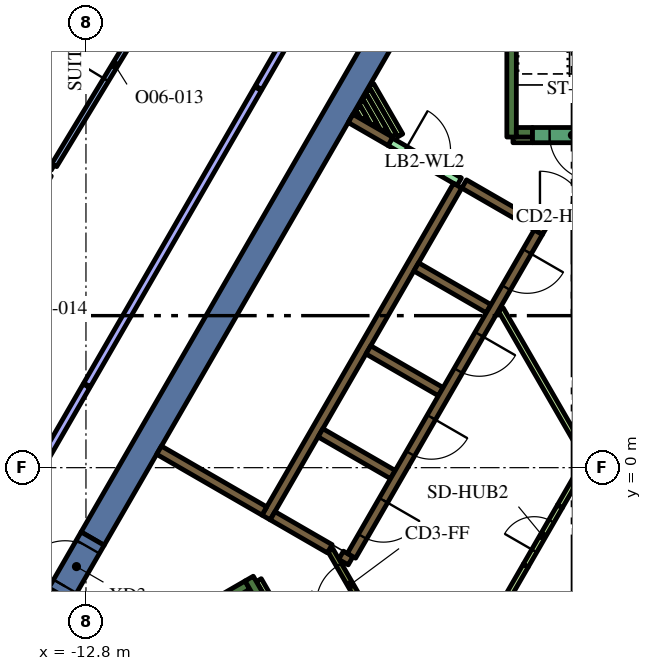
"""IFC4 building model, lengths in metres.
Left out: names, types, materials, properties, quantities, classifications, styles, units other than length and angle.
Written with IfcOpenShell. Run it as: python <this file> out.ifc"""

import sys

from ifc_helpers import new_model, si_unit, direction, frame, frame_2d, origin, place, context, subcontext, project, spatial, polyline, rectangle, outline, extrude, element, fill, save


model = new_model("IFC4")
c1 = context("Model", 3, precision=1e-05, world=origin(), true_north=direction((0.0, 1.0)))
c2 = subcontext(c1, "Body", "Model", "MODEL_VIEW")
j1 = project(units=[si_unit("LENGTHUNIT", "METRE"), si_unit("PLANEANGLEUNIT", "RADIAN")], contexts=[c1])
p1 = place(None, origin())
s1 = spatial("IfcSite", under=j1, at=p1, CompositionType="ELEMENT")
p2 = place(p1, origin())
s2 = spatial("IfcBuilding", under=s1, at=p2, CompositionType="ELEMENT")
p3 = place(p2, frame((0.0, 0.0, 201.6)))
s3 = spatial("IfcBuildingStorey", under=s2, at=p3, CompositionType="ELEMENT", Elevation=201.6)
p4 = place(p3, frame((-13.475, -3.339, 0.0), z_axis=(0.0, 0.0, 1.0), x_axis=(-0.500008214683, -0.866020660983, 0.0)))
e1 = element("IfcWall", 1, at=p4, inside=s3, PredefinedType="SOLIDWALL", context=c2, shape_type="SweptSolid", body=[
    extrude(rectangle(XDim=2.884, YDim=0.7, at=frame_2d((1.442, 0.0))), origin(), (0.0, 0.0, 1.0), 4.2),
])
p5 = place(p3, frame((-12.625, -1.867, 0.0), z_axis=(0.0, 0.0, 1.0), x_axis=(0.499998841866, 0.866026072432, 0.0)))
e2 = element("IfcWall", 2, at=p5, inside=s3, PredefinedType="SOLIDWALL", context=c2, shape_type="SweptSolid", body=[
    extrude(rectangle(XDim=16.694, YDim=0.7, at=frame_2d((8.347, 0.0))), origin(), (0.0, 0.0, 1.0), 4.2),
])
p6 = place(p3, frame((-1.6, 8.7, 0.0), z_axis=(0.0, 0.0, 1.0), x_axis=(0.0, 1.0, 0.0)))
e3 = element("IfcWall", 3, at=p6, inside=s3, PredefinedType="SOLIDWALL", context=c2, shape_type="SweptSolid", body=[
    extrude(rectangle(XDim=7.05, YDim=0.25, at=frame_2d((3.525, 0.0))), origin(), (0.0, 0.0, 1.0), 4.2),
])
p7 = place(p3, frame((-1.475, 8.825, 0.0), z_axis=(0.0, 0.0, 1.0), x_axis=(1.0, 0.0, 0.0)))
e4 = element("IfcWall", 4, at=p7, inside=s3, PredefinedType="SOLIDWALL", context=c2, shape_type="SweptSolid", body=[
    extrude(rectangle(XDim=0.425, YDim=0.25, at=frame_2d((0.212, 0.0))), origin(), (0.0, 0.0, 1.0), 4.2),
])
p8 = place(p3, frame((-14.44, -6.49, 0.0), z_axis=(0.0, 0.0, 1.0), x_axis=(0.866022966069, 0.500004222222, 0.0)))
e5 = element("IfcWall", 5, at=p8, inside=s3, PredefinedType="SOLIDWALL", context=c2, shape_type="SweptSolid", body=[
    extrude(rectangle(XDim=6.8, YDim=0.25, at=frame_2d((3.4, 0.0))), origin(), (0.0, 0.0, 1.0), 4.2),
])
p9 = place(p3, frame((-8.168, -3.503, 0.0), z_axis=(0.0, 0.0, 1.0), x_axis=(-0.499952099219, 0.866053057547, 0.0)))
e6 = element("IfcWall", 6, at=p9, inside=s3, PredefinedType="SOLIDWALL", context=c2, shape_type="SweptSolid", body=[
    extrude(rectangle(XDim=0.675, YDim=0.25, at=frame_2d((0.337, 0.0))), origin(), (0.0, 0.0, 1.0), 4.2),
])
p10 = place(p3, frame((-3.02, 7.419, 0.0), z_axis=(0.0, 0.0, 1.0), x_axis=(-0.500022956343, -0.866012149528, 0.0)))
e7 = element("IfcWall", 7, at=p10, inside=s3, PredefinedType="SOLIDWALL", context=c2, shape_type="SweptSolid", body=[
    extrude(rectangle(XDim=10.08, YDim=0.25, at=frame_2d((5.04, 0.0))), origin(), (0.0, 0.0, 1.0), 4.2),
])
p11 = place(p3, origin())
e8 = element("IfcWall", 8, at=p11, inside=s3, PredefinedType="SOLIDWALL", context=c2, shape_type="SweptSolid", body=[
    extrude(outline(polyline([(-2.912, 7.356), (-2.787, 7.573), (-1.232, 6.675), (-1.303, 6.675), (-1.304, 6.675), (-1.304, 6.675), (-1.304, 6.525), (-1.304, 6.525), (-1.303, 6.525), (-0.971, 6.525), (-0.665, 6.348), (-0.79, 6.132), (-1.007, 6.257), (-1.007, 6.257), (-2.912, 7.356)])), origin(), (0.0, 0.0, 1.0), 4.2),
])
for number, where, z_axis, x_axis in (
    (9, (-2.204, 4.182, 0.0), (0.0, 0.0, 1.0), (-0.866, 0.5, 0.0)),
    (10, (-5.369, 3.1, 0.0), (0.0, 0.0, 1.0), (0.866, -0.5, 0.0)),
    (11, (-4.724, -0.182, 0.0), (0.0, 0.0, 1.0), (-0.866, 0.5, 0.0)),
):
    element("IfcWall", number, at=place(p3, frame(where, z_axis=z_axis, x_axis=x_axis)), inside=s3, PredefinedType="SOLIDWALL", context=c2, shape_type="SweptSolid", body=[
        extrude(rectangle(XDim=2.2, YDim=0.25, at=frame_2d((1.1, 0.0))), origin(), (0.0, 0.0, 1.0), 4.2),
    ])
p12 = place(p3, frame((-6.088, -2.305, 0.0), z_axis=(0.0, 0.0, 1.0), x_axis=(0.866059450854, -0.499941024108, 0.0)))
e12 = element("IfcWall", 12, at=p12, inside=s3, PredefinedType="SOLIDWALL", context=c2, shape_type="SweptSolid", body=[
    extrude(rectangle(XDim=0.29, YDim=0.25, at=frame_2d((0.145, 0.0))), origin(), (0.0, 0.0, 1.0), 4.2),
])
p13 = place(p3, frame((-7.889, -1.265, 0.0), z_axis=(0.0, 0.0, 1.0), x_axis=(0.865986741702, -0.500066958712, 0.0)))
e13 = element("IfcWall", 13, at=p13, inside=s3, PredefinedType="SOLIDWALL", context=c2, shape_type="SweptSolid", body=[
    extrude(rectangle(XDim=1.738, YDim=0.25, at=frame_2d((0.869, 0.0))), origin(), (0.0, 0.0, 1.0), 4.2),
])
p14 = place(p3, frame((-8.106, -1.14, 0.0), z_axis=(0.0, 0.0, 1.0), x_axis=(-0.866008981251, 0.500028443584, 0.0)))
e14 = element("IfcWall", 14, at=p14, inside=s3, PredefinedType="SOLIDWALL", context=c2, shape_type="SweptSolid", body=[
    extrude(rectangle(XDim=3.2, YDim=0.25, at=frame_2d((1.6, 0.0))), origin(), (0.0, 0.0, 1.0), 4.2),
])
p15 = place(p3, frame((-5.837, 9.19, 0.0), z_axis=(0.0, 0.0, 1.0), x_axis=(0.866024298998, -0.500001913541, 0.0)))
e15 = element("IfcWall", 15, at=p15, inside=s3, PredefinedType="SOLIDWALL", context=c2, shape_type="SweptSolid", body=[
    extrude(rectangle(XDim=1.21, YDim=0.25, at=frame_2d((0.605, 0.0))), origin(), (0.0, 0.0, 1.0), 4.2),
])
p16 = place(p3, frame((-8.252, -2.958, 0.0), z_axis=(0.0, 0.0, 1.0), x_axis=(0.500174715838, -0.865924508047, 0.0)))
e16 = element("IfcWall", 16, at=p16, inside=s3, PredefinedType="PARTITIONING", context=c2, shape_type="SweptSolid", body=[
    extrude(rectangle(XDim=0.514, YDim=0.15, at=frame_2d((0.257, 0.0))), origin(), (0.0, 0.0, 1.0), 3.45),
])
p17 = place(p3, frame((-5.294, 10.067, 0.0), z_axis=(0.0, 0.0, 1.0), x_axis=(0.500054140411, -0.865994143547, 0.0)))
e17 = element("IfcWall", 17, at=p17, inside=s3, PredefinedType="PARTITIONING", context=c2, shape_type="SweptSolid", body=[
    extrude(rectangle(XDim=1.529, YDim=0.15, at=frame_2d((0.765, 0.0))), origin(), (0.0, 0.0, 1.0), 3.45),
])
p18 = place(p3, frame((-5.381, 9.917, 0.0), z_axis=(0.0, 0.0, 1.0), x_axis=(0.500136970483, -0.865946309396, 0.0)))
e18 = element("IfcWall", 18, at=p18, inside=s3, PredefinedType="PARTITIONING", context=c2, shape_type="SweptSolid", body=[
    extrude(rectangle(XDim=1.359, YDim=0.15, at=frame_2d((0.68, 0.0))), origin(), (0.0, 0.0, 1.0), 3.45),
])
p19 = place(p3, frame((-5.467, 9.767, 0.0), z_axis=(0.0, 0.0, 1.0), x_axis=(0.500168849293, -0.86592789665, 0.0)))
e19 = element("IfcWall", 19, at=p19, inside=s3, PredefinedType="PARTITIONING", context=c2, shape_type="SweptSolid", body=[
    extrude(rectangle(XDim=1.01, YDim=0.15, at=frame_2d((0.505, 0.0))), origin(), (0.0, 0.0, 1.0), 3.45),
])
p20 = place(p3, frame((-5.554, 9.617, 0.0), z_axis=(0.0, 0.0, 1.0), x_axis=(0.500253084543, -0.86587923604, 0.0)))
e20 = element("IfcWall", 20, at=p20, inside=s3, PredefinedType="PARTITIONING", context=c2, shape_type="SweptSolid", body=[
    extrude(rectangle(XDim=0.664, YDim=0.15, at=frame_2d((0.332, 0.0))), origin(), (0.0, 0.0, 1.0), 3.45),
])
p21 = place(p3, frame((-5.64, 9.467, 0.0), z_axis=(0.0, 0.0, 1.0), x_axis=(0.499944387978, -0.86605750902, 0.0)))
e21 = element("IfcWall", 21, at=p21, inside=s3, PredefinedType="PARTITIONING", context=c2, shape_type="SweptSolid", body=[
    extrude(rectangle(XDim=0.317, YDim=0.15, at=frame_2d((0.159, 0.0))), origin(), (0.0, 0.0, 1.0), 3.45),
])
p22 = place(p3, frame((-1.564, 8.625, 0.0), z_axis=(0.0, 0.0, 1.0), x_axis=(1.0, 0.0, 0.0)))
e22 = element("IfcWall", 22, at=p22, inside=s3, PredefinedType="PARTITIONING", context=c2, shape_type="SweptSolid", body=[
    extrude(rectangle(XDim=0.514, YDim=0.15, at=frame_2d((0.257, 0.0))), origin(), (0.0, 0.0, 1.0), 3.45),
])
p23 = place(p3, frame((-1.887, 4.168, 0.0), z_axis=(0.0, 0.0, 1.0), x_axis=(0.499997069472, -0.866027095719, 0.0)))
e23 = element("IfcWall", 23, at=p23, inside=s3, PredefinedType="PARTITIONING", context=c2, shape_type="SweptSolid", body=[
    extrude(rectangle(XDim=9.106, YDim=0.15, at=frame_2d((4.553, 0.0))), origin(), (0.0, 0.0, 1.0), 3.45),
])
for number, where, z_axis, x_axis in (
    (24, (-0.329, -1.021, 0.0), (0.0, 0.0, 1.0), (0.5, 0.866, 0.0)),
    (25, (-1.887, -3.718, 0.0), (0.0, 0.0, 1.0), (0.5, 0.866, 0.0)),
):
    element("IfcWall", number, at=place(p3, frame(where, z_axis=z_axis, x_axis=x_axis)), inside=s3, PredefinedType="PARTITIONING", context=c2, shape_type="SweptSolid", body=[
        extrude(rectangle(XDim=1.315, YDim=0.15, at=frame_2d((0.657, 0.0))), origin(), (0.0, 0.0, 1.0), 3.45),
    ])
p24 = place(p3, frame((-0.898, 6.194, 0.0), z_axis=(0.0, 0.0, 1.0), x_axis=(-0.499996202215, -0.866027596426, 0.0)))
e26 = element("IfcWall", 26, at=p24, inside=s3, PredefinedType="SOLIDWALL", context=c2, shape_type="SweptSolid", body=[
    extrude(rectangle(XDim=9.83, YDim=0.25, at=frame_2d((4.915, 0.0))), origin(), (0.0, 0.0, 1.0), 4.2),
])
p25 = place(p24, frame((0.585, 0.0, 0.0)))
e27 = element("IfcOpeningElement", 27, at=p25, cuts=e26, PredefinedType="OPENING", context=c2, shape_type="SweptSolid", body=[
    extrude(rectangle(XDim=1.1, YDim=2.1, at=frame_2d((0.55, 1.05))), frame((0.0, 0.135, 0.0), z_axis=(0.0, -1.0, 0.0), x_axis=(1.0, 0.0, 0.0)), (0.0, 0.0, 1.0), 0.27),
])
p26 = place(p24, frame((3.105, 0.0, 0.0)))
e28 = element("IfcOpeningElement", 28, at=p26, cuts=e26, PredefinedType="OPENING", context=c2, shape_type="SweptSolid", body=[
    extrude(rectangle(XDim=1.1, YDim=2.1, at=frame_2d((0.55, 1.05))), frame((0.0, 0.135, 0.0), z_axis=(0.0, -1.0, 0.0), x_axis=(1.0, 0.0, 0.0)), (0.0, 0.0, 1.0), 0.27),
])
p27 = place(p24, frame((5.625, 0.0, 0.0)))
e29 = element("IfcOpeningElement", 29, at=p27, cuts=e26, PredefinedType="OPENING", context=c2, shape_type="SweptSolid", body=[
    extrude(rectangle(XDim=1.1, YDim=2.1, at=frame_2d((0.55, 1.05))), frame((0.0, 0.135, 0.0), z_axis=(0.0, -1.0, 0.0), x_axis=(1.0, 0.0, 0.0)), (0.0, 0.0, 1.0), 0.27),
])
p28 = place(p24, frame((8.145, 0.0, 0.0)))
e30 = element("IfcOpeningElement", 30, at=p28, cuts=e26, PredefinedType="OPENING", context=c2, shape_type="SweptSolid", body=[
    extrude(rectangle(XDim=1.1, YDim=2.1, at=frame_2d((0.55, 1.05))), frame((0.0, 0.135, 0.0), z_axis=(0.0, -1.0, 0.0), x_axis=(1.0, 0.0, 0.0)), (0.0, 0.0, 1.0), 0.27),
])
p29 = place(p3, frame((1.05, 8.75, 0.0), z_axis=(0.0, 0.0, 1.0), x_axis=(-1.0, 0.0, 0.0)))
e31 = element("IfcWall", 31, at=p29, inside=s3, PredefinedType="SOLIDWALL", context=c2, shape_type="SweptSolid", body=[
    extrude(rectangle(XDim=2.1, YDim=0.4, at=frame_2d((1.05, 0.0))), origin(), (0.0, 0.0, 1.0), 4.2),
])
p30 = place(p29, frame((0.45, 0.0, 0.0)))
e32 = element("IfcOpeningElement", 32, at=p30, cuts=e31, PredefinedType="OPENING", context=c2, shape_type="SweptSolid", body=[
    extrude(rectangle(XDim=1.2, YDim=2.1, at=frame_2d((0.6, 1.05))), frame((0.0, 0.21, 0.0), z_axis=(0.0, -1.0, 0.0), x_axis=(1.0, 0.0, 0.0)), (0.0, 0.0, 1.0), 0.42),
])
p31 = place(p3, frame((-1.303, 6.6, 0.0), z_axis=(0.0, 0.0, 1.0), x_axis=(1.0, 0.0, 0.0)))
e33 = element("IfcWall", 33, at=p31, inside=s3, PredefinedType="PARTITIONING", context=c2, shape_type="SweptSolid", body=[
    extrude(rectangle(XDim=2.1, YDim=0.15, at=frame_2d((1.05, 0.0))), origin(), (0.0, 0.0, 1.0), 4.2),
])
p32 = place(p31, frame((0.45, 0.0, 0.0)))
e34 = element("IfcOpeningElement", 34, at=p32, cuts=e33, PredefinedType="OPENING", context=c2, shape_type="SweptSolid", body=[
    extrude(rectangle(XDim=1.2, YDim=2.1, at=frame_2d((0.6, 1.05))), frame((0.0, 0.085, 0.0), z_axis=(0.0, -1.0, 0.0), x_axis=(1.0, 0.0, 0.0)), (0.0, 0.0, 1.0), 0.17),
])
p33 = place(p3, frame((-5.317, -3.99, 0.0), z_axis=(0.0, 0.0, 1.0), x_axis=(-0.500027713859, 0.866009402589, 0.0)))
e35 = element("IfcWall", 35, at=p33, inside=s3, PredefinedType="PARTITIONING", context=c2, shape_type="SweptSolid", body=[
    extrude(rectangle(XDim=2.1, YDim=0.15, at=frame_2d((1.05, 0.0))), origin(), (0.0, 0.0, 1.0), 4.2),
])
p34 = place(p33, frame((0.45, 0.0, 0.0)))
e36 = element("IfcOpeningElement", 36, at=p34, cuts=e35, PredefinedType="OPENING", context=c2, shape_type="SweptSolid", body=[
    extrude(rectangle(XDim=1.2, YDim=2.1, at=frame_2d((0.6, 1.05))), frame((0.0, 0.085, 0.0), z_axis=(0.0, -1.0, 0.0), x_axis=(1.0, 0.0, 0.0)), (0.0, 0.0, 1.0), 0.17),
])
p35 = place(p3, frame((-4.796, 8.575, 0.0), z_axis=(0.0, 0.0, 1.0), x_axis=(0.866009402589, -0.500027713859, 0.0)))
e37 = element("IfcWall", 37, at=p35, inside=s3, PredefinedType="PARTITIONING", context=c2, shape_type="SweptSolid", body=[
    extrude(rectangle(XDim=2.1, YDim=0.226, at=frame_2d((1.05, 0.0))), origin(), (0.0, 0.0, 1.0), 3.45),
])
p36 = place(p35, frame((0.45, 0.0, 0.0)))
e38 = element("IfcOpeningElement", 38, at=p36, cuts=e37, PredefinedType="OPENING", context=c2, shape_type="SweptSolid", body=[
    extrude(rectangle(XDim=1.2, YDim=2.1, at=frame_2d((0.6, 1.05))), frame((0.0, 0.123, 0.0), z_axis=(0.0, -1.0, 0.0), x_axis=(1.0, 0.0, 0.0)), (0.0, 0.0, 1.0), 0.246),
])
p37 = place(p3, frame((-13.475, -3.339, 0.0), z_axis=(0.0, 0.0, 1.0), x_axis=(0.499954529098, 0.86605165483, 0.0)))
e39 = element("IfcWall", 39, at=p37, inside=s3, PredefinedType="SOLIDWALL", context=c2, shape_type="SweptSolid", body=[
    extrude(rectangle(XDim=1.7, YDim=0.7, at=frame_2d((0.85, 0.0))), origin(), (0.0, 0.0, 1.0), 4.2),
])
p38 = place(p37, frame((0.25, 0.0, 0.0)))
e40 = element("IfcOpeningElement", 40, at=p38, cuts=e39, PredefinedType="OPENING", context=c2, shape_type="SweptSolid", body=[
    extrude(rectangle(XDim=1.2, YDim=2.1, at=frame_2d((0.6, 1.05))), frame((0.0, 0.36, 0.0), z_axis=(0.0, -1.0, 0.0), x_axis=(1.0, 0.0, 0.0)), (0.0, 0.0, 1.0), 0.72),
])
p39 = place(p3, frame((-1.229, -2.579, 0.0), z_axis=(0.0, 0.0, 1.0), x_axis=(0.500062916607, 0.865989075817, 0.0)))
e41 = element("IfcWall", 41, at=p39, inside=s3, PredefinedType="PARTITIONING", context=c2, shape_type="SweptSolid", body=[
    extrude(rectangle(XDim=1.8, YDim=0.15, at=frame_2d((0.9, 0.0))), origin(), (0.0, 0.0, 1.0), 3.45),
])
p40 = place(p39, frame((0.45, 0.0, 0.0)))
e42 = element("IfcOpeningElement", 42, at=p40, cuts=e41, PredefinedType="OPENING", context=c2, shape_type="SweptSolid", body=[
    extrude(rectangle(XDim=0.9, YDim=2.1, at=frame_2d((0.45, 1.05))), frame((0.0, 0.085, 0.0), z_axis=(0.0, -1.0, 0.0), x_axis=(1.0, 0.0, 0.0)), (0.0, 0.0, 1.0), 0.17),
])
p41 = place(p3, frame((-13.674, 7.895, 0.0), z_axis=(0.0, 0.0, 1.0), x_axis=(-0.866032537582, 0.499987643696, 0.0)))
e43 = element("IfcWall", 43, at=p41, inside=s3, PredefinedType="PARTITIONING", context=c2, shape_type="SweptSolid", body=[
    extrude(rectangle(XDim=3.241, YDim=0.15, at=frame_2d((1.62, 0.0))), origin(), (0.0, 0.0, 1.0), 3.45),
])
p42 = place(p3, frame((-13.635, 7.959, 0.0), z_axis=(0.0, 0.0, 1.0), x_axis=(0.518788941184, 0.854902353784, 0.0)))
e44 = element("IfcWall", 44, at=p42, inside=s3, PredefinedType="PARTITIONING", context=c2, shape_type="SweptSolid", body=[
    extrude(rectangle(XDim=6.129, YDim=0.15, at=frame_2d((3.064, 0.0))), origin(), (0.0, 0.0, 1.0), 3.45),
])
p43 = place(p42, frame((2.629, 0.0, 0.0)))
e45 = element("IfcOpeningElement", 45, at=p43, cuts=e44, PredefinedType="OPENING", context=c2, shape_type="SweptSolid", body=[
    extrude(rectangle(XDim=0.9, YDim=2.1, at=frame_2d((0.45, 1.05))), frame((0.0, 0.085, 0.0), z_axis=(0.0, -1.0, 0.0), x_axis=(1.0, 0.0, 0.0)), (0.0, 0.0, 1.0), 0.17),
])
p44 = place(p3, frame((-8.272, 9.972, 0.0), z_axis=(0.0, 0.0, 1.0), x_axis=(-0.5000018851, -0.866024315419, 0.0)))
e46 = element("IfcWall", 46, at=p44, inside=s3, PredefinedType="PARTITIONING", context=c2, shape_type="SweptSolid", body=[
    extrude(rectangle(XDim=9.0, YDim=0.2, at=frame_2d((4.5, 0.0))), origin(), (0.0, 0.0, 1.0), 3.45),
])
p45 = place(p3, frame((-12.787, 2.152, 0.0), z_axis=(0.0, 0.0, 1.0), x_axis=(-0.50000660679, -0.866021589319, 0.0)))
e47 = element("IfcWall", 47, at=p45, inside=s3, PredefinedType="PARTITIONING", context=c2, shape_type="SweptSolid", body=[
    extrude(rectangle(XDim=9.817, YDim=0.2, at=frame_2d((4.909, 0.0))), origin(), (0.0, 0.0, 1.0), 3.45),
])
p46 = place(p45, frame((4.4, 0.0, 0.0)))
e48 = element("IfcOpeningElement", 48, at=p46, cuts=e47, PredefinedType="OPENING", context=c2, shape_type="SweptSolid", body=[
    extrude(rectangle(XDim=1.0, YDim=2.1, at=frame_2d((0.5, 1.05))), frame((0.0, 0.11, 0.0), z_axis=(0.0, -1.0, 0.0), x_axis=(1.0, 0.0, 0.0)), (0.0, 0.0, 1.0), 0.22),
])
p47 = place(p3, frame((-4.148, 17.115, 0.0), z_axis=(0.0, 0.0, 1.0), x_axis=(-0.499983057696, -0.866035185207, 0.0)))
e49 = element("IfcWall", 49, at=p47, inside=s3, PredefinedType="PARTITIONING", context=c2, shape_type="SweptSolid", body=[
    extrude(rectangle(XDim=8.218, YDim=0.2, at=frame_2d((4.109, 0.0))), origin(), (0.0, 0.0, 1.0), 3.45),
])
p48 = place(p25, origin())
e50 = element("IfcDoor", 50, at=p48, inside=s3, OperationType="DOUBLE_DOOR_SLIDING", PredefinedType="DOOR", context=c2, shape_type="SweptSolid", body=[
    extrude(rectangle(XDim=1.1, YDim=2.1, at=frame_2d((0.55, 1.05))), frame((0.0, 0.025, 0.0), z_axis=(0.0, -1.0, 0.0), x_axis=(1.0, 0.0, 0.0)), (0.0, 0.0, 1.0), 0.05),
])
fill(e27, e50)
p49 = place(p26, origin())
e51 = element("IfcDoor", 51, at=p49, inside=s3, OperationType="DOUBLE_DOOR_SLIDING", PredefinedType="DOOR", context=c2, shape_type="SweptSolid", body=[
    extrude(rectangle(XDim=1.1, YDim=2.1, at=frame_2d((0.55, 1.05))), frame((0.0, 0.025, 0.0), z_axis=(0.0, -1.0, 0.0), x_axis=(1.0, 0.0, 0.0)), (0.0, 0.0, 1.0), 0.05),
])
fill(e28, e51)
p50 = place(p27, origin())
e52 = element("IfcDoor", 52, at=p50, inside=s3, OperationType="DOUBLE_DOOR_SLIDING", PredefinedType="DOOR", context=c2, shape_type="SweptSolid", body=[
    extrude(rectangle(XDim=1.1, YDim=2.1, at=frame_2d((0.55, 1.05))), frame((0.0, 0.025, 0.0), z_axis=(0.0, -1.0, 0.0), x_axis=(1.0, 0.0, 0.0)), (0.0, 0.0, 1.0), 0.05),
])
fill(e29, e52)
p51 = place(p28, origin())
e53 = element("IfcDoor", 53, at=p51, inside=s3, OperationType="DOUBLE_DOOR_SLIDING", PredefinedType="DOOR", context=c2, shape_type="SweptSolid", body=[
    extrude(rectangle(XDim=1.1, YDim=2.1, at=frame_2d((0.55, 1.05))), frame((0.0, 0.025, 0.0), z_axis=(0.0, -1.0, 0.0), x_axis=(1.0, 0.0, 0.0)), (0.0, 0.0, 1.0), 0.05),
])
fill(e30, e53)
p52 = place(p30, origin())
e54 = element("IfcDoor", 54, at=p52, inside=s3, OperationType="SINGLE_SWING_LEFT", PredefinedType="DOOR", context=c2, shape_type="SweptSolid", body=[
    extrude(rectangle(XDim=1.2, YDim=2.1, at=frame_2d((0.6, 1.05))), frame((0.0, 0.025, 0.0), z_axis=(0.0, -1.0, 0.0), x_axis=(1.0, 0.0, 0.0)), (0.0, 0.0, 1.0), 0.05),
])
fill(e32, e54)
p53 = place(p32, origin())
e55 = element("IfcDoor", 55, at=p53, inside=s3, OperationType="SINGLE_SWING_LEFT", PredefinedType="DOOR", context=c2, shape_type="SweptSolid", body=[
    extrude(rectangle(XDim=1.2, YDim=2.1, at=frame_2d((0.6, 1.05))), frame((0.0, 0.025, 0.0), z_axis=(0.0, -1.0, 0.0), x_axis=(1.0, 0.0, 0.0)), (0.0, 0.0, 1.0), 0.05),
])
fill(e34, e55)
p54 = place(p34, origin())
e56 = element("IfcDoor", 56, at=p54, inside=s3, OperationType="SINGLE_SWING_LEFT", PredefinedType="DOOR", context=c2, shape_type="SweptSolid", body=[
    extrude(rectangle(XDim=1.2, YDim=2.1, at=frame_2d((0.6, 1.05))), frame((0.0, 0.025, 0.0), z_axis=(0.0, -1.0, 0.0), x_axis=(1.0, 0.0, 0.0)), (0.0, 0.0, 1.0), 0.05),
])
fill(e36, e56)
p55 = place(p36, origin())
e57 = element("IfcDoor", 57, at=p55, inside=s3, OperationType="SINGLE_SWING_LEFT", PredefinedType="DOOR", context=c2, shape_type="SweptSolid", body=[
    extrude(rectangle(XDim=1.2, YDim=2.1, at=frame_2d((0.6, 1.05))), frame((0.0, 0.025, 0.0), z_axis=(0.0, -1.0, 0.0), x_axis=(1.0, 0.0, 0.0)), (0.0, 0.0, 1.0), 0.05),
])
fill(e38, e57)
p56 = place(p38, origin())
e58 = element("IfcDoor", 58, at=p56, inside=s3, OperationType="SINGLE_SWING_LEFT", PredefinedType="DOOR", context=c2, shape_type="SweptSolid", body=[
    extrude(rectangle(XDim=1.2, YDim=2.1, at=frame_2d((0.6, 1.05))), frame((0.0, 0.025, 0.0), z_axis=(0.0, -1.0, 0.0), x_axis=(1.0, 0.0, 0.0)), (0.0, 0.0, 1.0), 0.05),
])
fill(e40, e58)
p57 = place(p40, origin())
e59 = element("IfcDoor", 59, at=p57, inside=s3, OperationType="SINGLE_SWING_LEFT", PredefinedType="DOOR", context=c2, shape_type="SweptSolid", body=[
    extrude(rectangle(XDim=0.9, YDim=2.1, at=frame_2d((0.45, 1.05))), frame((0.0, 0.025, 0.0), z_axis=(0.0, -1.0, 0.0), x_axis=(1.0, 0.0, 0.0)), (0.0, 0.0, 1.0), 0.05),
])
fill(e42, e59)
p58 = place(p43, origin())
e60 = element("IfcDoor", 60, at=p58, inside=s3, OperationType="SINGLE_SWING_RIGHT", PredefinedType="DOOR", context=c2, shape_type="SweptSolid", body=[
    extrude(rectangle(XDim=0.9, YDim=2.1, at=frame_2d((0.45, 1.05))), frame((0.0, 0.025, 0.0), z_axis=(0.0, -1.0, 0.0), x_axis=(1.0, 0.0, 0.0)), (0.0, 0.0, 1.0), 0.05),
])
fill(e45, e60)
save(model, sys.argv[1])
